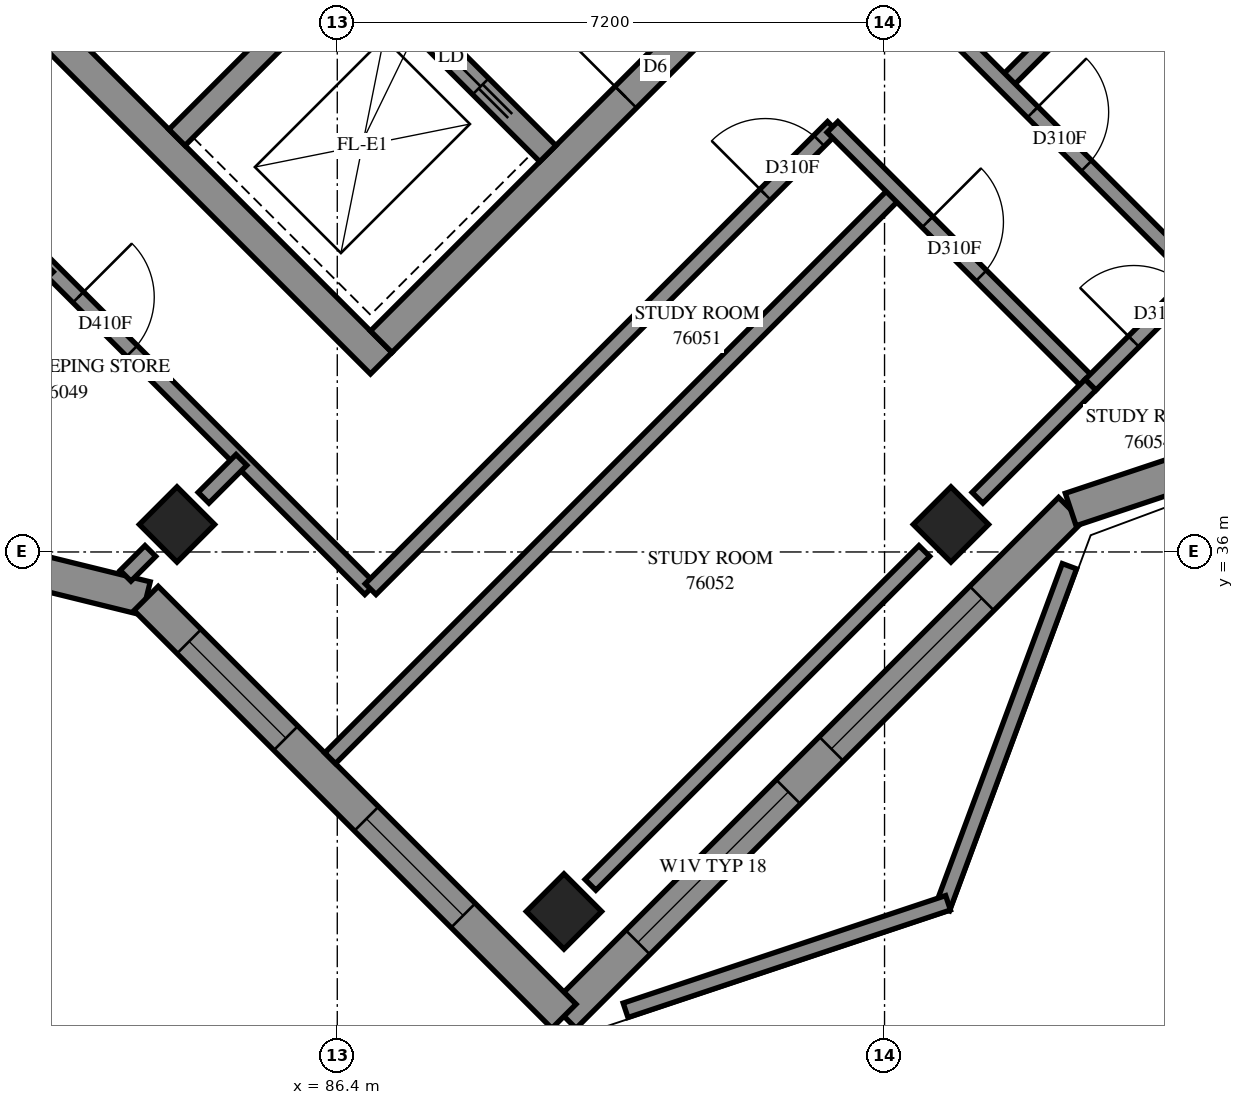
"""IFC4 building model, lengths in metres.
Left out: names, types, materials, properties, quantities, classifications, styles, units other than length and angle.
Written with IfcOpenShell. Run it as: python <this file> out.ifc"""

import sys

from ifc_helpers import new_model, si_unit, direction, frame, frame_2d, origin, origin_2d, place, context, subcontext, project, spatial, polyline, rectangle, outline, extrude, element, fill, save


model = new_model("IFC4")
c1 = context("Model", 3, precision=1e-05, world=origin(), true_north=direction((0.0, 1.0)))
c2 = subcontext(c1, "Body", "Model", "MODEL_VIEW")
j1 = project(units=[si_unit("LENGTHUNIT", "METRE"), si_unit("PLANEANGLEUNIT", "RADIAN")], contexts=[c1])
p1 = place(None, origin())
s1 = spatial("IfcSite", under=j1, at=p1, CompositionType="ELEMENT")
p2 = place(p1, origin())
s2 = spatial("IfcBuilding", under=s1, at=p2, CompositionType="ELEMENT")
p3 = place(p2, frame((0.0, 0.0, 277.8)))
s3 = spatial("IfcBuildingStorey", under=s2, at=p3, CompositionType="ELEMENT", Elevation=277.8)
for number, where, z_axis, x_axis in (
    (1, (84.291, 36.362, 0.0), (0.0, 0.0, 1.0), (0.707, -0.707, 0.0)),
    (2, (94.474, 36.362, 0.0), (0.0, 0.0, 1.0), (0.707, -0.707, 0.0)),
    (3, (89.382, 31.271, 0.0), (0.0, 0.0, 1.0), (0.707, -0.707, 0.0)),
):
    element("IfcColumn", number, at=place(p3, frame(where, z_axis=z_axis, x_axis=x_axis)), inside=s3, PredefinedType="COLUMN", context=c2, shape_type="SweptSolid", body=[
        extrude(rectangle(XDim=0.7, YDim=0.7, at=origin_2d()), origin(), (0.0, 0.0, 1.0), 3.1),
    ])
p4 = place(p3, frame((76.23, 49.231, -0.3), z_axis=(0.0, 0.0, 1.0), x_axis=(0.7071034917, -0.7071100706, 0.0)))
e4 = element("IfcWall", 4, at=p4, inside=s3, PredefinedType="SHEAR", context=c2, shape_type="SweptSolid", body=[
    extrude(rectangle(XDim=15.2, YDim=0.4, at=frame_2d((7.6, 0.0))), origin(), (0.0, 0.0, 1.0), 2.7),
])
p5 = place(p3, frame((86.978, 38.766, -0.3), z_axis=(0.0, 0.0, 1.0), x_axis=(0.7071067812, 0.7071067812, 0.0)))
e5 = element("IfcWall", 5, at=p5, inside=s3, PredefinedType="SHEAR", context=c2, shape_type="SweptSolid", body=[
    extrude(rectangle(XDim=14.4, YDim=0.4, at=frame_2d((7.2, 0.0))), origin(), (0.0, 0.0, 1.0), 2.7),
])
p6 = place(p5, frame((4.55, 0.0, 0.3)))
e6 = element("IfcOpeningElement", 6, at=p6, cuts=e5, PredefinedType="OPENING", context=c2, shape_type="SweptSolid", body=[
    extrude(rectangle(XDim=1.1, YDim=2.1, at=frame_2d((0.55, 1.05))), frame((0.0, 0.21, 0.0), z_axis=(0.0, -1.0, 0.0), x_axis=(1.0, 0.0, 0.0)), (0.0, 0.0, 1.0), 0.42),
])
p7 = place(p5, frame((11.35, 0.0, 0.3)))
e7 = element("IfcOpeningElement", 7, at=p7, cuts=e5, PredefinedType="OPENING", context=c2, shape_type="SweptSolid", body=[
    extrude(rectangle(XDim=1.1, YDim=2.1, at=frame_2d((0.55, 1.05))), frame((0.0, 0.21, 0.0), z_axis=(0.0, -1.0, 0.0), x_axis=(1.0, 0.0, 0.0)), (0.0, 0.0, 1.0), 0.42),
])
p8 = place(p3, frame((84.291, 41.453, 0.0), z_axis=(0.0, 0.0, 1.0), x_axis=(0.7071067812, 0.7071067812, 0.0)))
e8 = element("IfcWall", 8, at=p8, inside=s3, PredefinedType="SOLIDWALL", context=c2, shape_type="SweptSolid", body=[
    extrude(rectangle(XDim=3.3, YDim=0.3, at=frame_2d((1.65, 0.0))), origin(), (0.0, 0.0, 1.0), 3.1),
])
p9 = place(p3, frame((78.988, 51.423, 0.0), z_axis=(0.0, 0.0, 1.0), x_axis=(0.7071067812, -0.7071067812, 0.0)))
e9 = element("IfcWall", 9, at=p9, inside=s3, PredefinedType="SOLIDWALL", context=c2, shape_type="SweptSolid", body=[
    extrude(rectangle(XDim=14.4, YDim=0.3, at=frame_2d((7.2, 0.0))), origin(), (0.0, 0.0, 1.0), 3.1),
])
p10 = place(p9, frame((1.35, 0.0, 0.0)))
e10 = element("IfcOpeningElement", 10, at=p10, cuts=e9, PredefinedType="OPENING", context=c2, shape_type="SweptSolid", body=[
    extrude(rectangle(XDim=0.9, YDim=2.1, at=frame_2d((0.45, 1.05))), frame((0.0, 0.16, 0.0), z_axis=(0.0, -1.0, 0.0), x_axis=(1.0, 0.0, 0.0)), (0.0, 0.0, 1.0), 0.32),
])
p11 = place(p9, frame((4.95, 0.0, 0.0)))
e11 = element("IfcOpeningElement", 11, at=p11, cuts=e9, PredefinedType="OPENING", context=c2, shape_type="SweptSolid", body=[
    extrude(rectangle(XDim=0.9, YDim=2.1, at=frame_2d((0.45, 1.05))), frame((0.0, 0.16, 0.0), z_axis=(0.0, -1.0, 0.0), x_axis=(1.0, 0.0, 0.0)), (0.0, 0.0, 1.0), 0.32),
])
p12 = place(p9, frame((8.55, 0.0, 0.0)))
e12 = element("IfcOpeningElement", 12, at=p12, cuts=e9, PredefinedType="OPENING", context=c2, shape_type="SweptSolid", body=[
    extrude(rectangle(XDim=0.9, YDim=2.1, at=frame_2d((0.45, 1.05))), frame((0.0, 0.16, 0.0), z_axis=(0.0, -1.0, 0.0), x_axis=(1.0, 0.0, 0.0)), (0.0, 0.0, 1.0), 0.32),
])
p13 = place(p9, frame((12.05, 0.0, 0.0)))
e13 = element("IfcOpeningElement", 13, at=p13, cuts=e9, PredefinedType="OPENING", context=c2, shape_type="SweptSolid", body=[
    extrude(rectangle(XDim=1.1, YDim=2.1, at=frame_2d((0.55, 1.05))), frame((0.0, 0.16, 0.0), z_axis=(0.0, -1.0, 0.0), x_axis=(1.0, 0.0, 0.0)), (0.0, 0.0, 1.0), 0.32),
])
p14 = place(p3, frame((89.382, 29.892, 0.0), z_axis=(0.0, 0.0, 1.0), x_axis=(0.7071067812, 0.7071067812, 0.0)))
e14 = element("IfcWall", 14, at=p14, inside=s3, PredefinedType="SOLIDWALL", context=c2, shape_type="SweptSolid", body=[
    extrude(outline(polyline([(-0.225, -0.225), (9.375, -0.225), (9.481, 0.225), (0.225, 0.225), (-0.225, -0.225)])), origin(), (0.0, 0.0, 1.0), 3.1),
])
p15 = place(p14, frame((1.375, 0.0, 0.45)))
e15 = element("IfcOpeningElement", 15, at=p15, cuts=e14, PredefinedType="OPENING", context=c2, shape_type="SweptSolid", body=[
    extrude(rectangle(XDim=2.8, YDim=2.55, at=frame_2d((1.4, 1.275))), frame((0.0, 0.235, 0.0), z_axis=(0.0, -1.0, 0.0), x_axis=(1.0, 0.0, 0.0)), (0.0, 0.0, 1.0), 0.47),
])
p16 = place(p14, frame((4.975, 0.0, 0.45)))
e16 = element("IfcOpeningElement", 16, at=p16, cuts=e14, PredefinedType="OPENING", context=c2, shape_type="SweptSolid", body=[
    extrude(rectangle(XDim=2.8, YDim=2.55, at=frame_2d((1.4, 1.275))), frame((0.0, 0.235, 0.0), z_axis=(0.0, -1.0, 0.0), x_axis=(1.0, 0.0, 0.0)), (0.0, 0.0, 1.0), 0.47),
])
p17 = place(p3, frame((96.049, 36.559, 0.0), z_axis=(0.0, 0.0, 1.0), x_axis=(0.9486870665, 0.3162164604, 0.0)))
e17 = element("IfcWall", 17, at=p17, inside=s3, PredefinedType="SOLIDWALL", context=c2, shape_type="SweptSolid", body=[
    extrude(outline(polyline([(0.053, -0.225), (5.42, -0.225), (5.195, 0.225), (-0.053, 0.225), (0.053, -0.225)])), origin(), (0.0, 0.0, 1.0), 3.1),
])
p18 = place(p17, frame((1.704, 0.0, 0.45)))
e18 = element("IfcOpeningElement", 18, at=p18, cuts=e17, PredefinedType="OPENING", context=c2, shape_type="SweptSolid", body=[
    extrude(rectangle(XDim=2.8, YDim=2.55, at=frame_2d((1.4, 1.275))), frame((0.0, 0.235, 0.0), z_axis=(0.0, -1.0, 0.0), x_axis=(1.0, 0.0, 0.0)), (0.0, 0.0, 1.0), 0.47),
])
p19 = place(p3, frame((79.454, 36.48, 0.0), z_axis=(0.0, 0.0, 1.0), x_axis=(0.9709986041, -0.239085154, 0.0)))
e19 = element("IfcWall", 19, at=p19, inside=s3, PredefinedType="SOLIDWALL", context=c2, shape_type="SweptSolid", body=[
    extrude(outline(polyline([(-0.136, -0.225), (4.501, -0.225), (4.627, 0.225), (0.136, 0.225), (-0.136, -0.225)])), origin(), (0.0, 0.0, 1.0), 3.1),
])
p20 = place(p19, frame((0.991, 0.0, 0.7)))
e20 = element("IfcOpeningElement", 20, at=p20, cuts=e19, PredefinedType="OPENING", context=c2, shape_type="SweptSolid", body=[
    extrude(rectangle(XDim=1.8, YDim=1.8, at=frame_2d((0.9, 0.9))), frame((0.0, 0.235, 0.0), z_axis=(0.0, -1.0, 0.0), x_axis=(1.0, 0.0, 0.0)), (0.0, 0.0, 1.0), 0.47),
])
p21 = place(p3, frame((83.885, 35.389, 0.0), z_axis=(0.0, 0.0, 1.0), x_axis=(0.7071067812, -0.7071067812, 0.0)))
e21 = element("IfcWall", 21, at=p21, inside=s3, PredefinedType="SOLIDWALL", context=c2, shape_type="SweptSolid", body=[
    extrude(outline(polyline([(0.063, -0.225), (7.999, -0.225), (7.549, 0.225), (-0.063, 0.225), (0.063, -0.225)])), origin(), (0.0, 0.0, 1.0), 3.1),
])
p22 = place(p21, frame((0.799, 0.0, 0.7)))
e22 = element("IfcOpeningElement", 22, at=p22, cuts=e21, PredefinedType="OPENING", context=c2, shape_type="SweptSolid", body=[
    extrude(rectangle(XDim=1.8, YDim=1.8, at=frame_2d((0.9, 0.9))), frame((0.0, 0.235, 0.0), z_axis=(0.0, -1.0, 0.0), x_axis=(1.0, 0.0, 0.0)), (0.0, 0.0, 1.0), 0.47),
])
p23 = place(p21, frame((4.099, 0.0, 0.7)))
e23 = element("IfcOpeningElement", 23, at=p23, cuts=e21, PredefinedType="OPENING", context=c2, shape_type="SweptSolid", body=[
    extrude(rectangle(XDim=1.8, YDim=1.8, at=frame_2d((0.9, 0.9))), frame((0.0, 0.235, 0.0), z_axis=(0.0, -1.0, 0.0), x_axis=(1.0, 0.0, 0.0)), (0.0, 0.0, 1.0), 0.47),
])
p24 = place(p3, frame((86.306, 33.287, 0.0), z_axis=(0.0, 0.0, 1.0), x_axis=(0.7071020418, 0.7071115206, 0.0)))
e24 = element("IfcWall", 24, at=p24, inside=s3, PredefinedType="PARTITIONING", context=c2, shape_type="SweptSolid", body=[
    extrude(rectangle(XDim=10.55, YDim=0.2, at=frame_2d((5.275, 0.0))), origin(), (0.0, 0.0, 1.0), 3.1),
])
p25 = place(p3, frame((80.747, 41.597, 0.0), z_axis=(0.0, 0.0, 1.0), x_axis=(0.7071067812, -0.7071067812, 0.0)))
e25 = element("IfcWall", 25, at=p25, inside=s3, PredefinedType="PARTITIONING", context=c2, shape_type="SweptSolid", body=[
    extrude(rectangle(XDim=8.607, YDim=0.2, at=frame_2d((4.303, 0.0))), origin(), (0.0, 0.0, 1.0), 3.1),
])
p26 = place(p25, frame((0.195, 0.0, 0.0)))
e26 = element("IfcOpeningElement", 26, at=p26, cuts=e25, PredefinedType="OPENING", context=c2, shape_type="SweptSolid", body=[
    extrude(rectangle(XDim=1.0, YDim=2.1, at=frame_2d((0.5, 1.05))), frame((0.0, 0.11, 0.0), z_axis=(0.0, -1.0, 0.0), x_axis=(1.0, 0.0, 0.0)), (0.0, 0.0, 1.0), 0.22),
])
p27 = place(p25, frame((3.175, 0.0, 0.0)))
e27 = element("IfcOpeningElement", 27, at=p27, cuts=e25, PredefinedType="OPENING", context=c2, shape_type="SweptSolid", body=[
    extrude(rectangle(XDim=1.0, YDim=2.1, at=frame_2d((0.5, 1.05))), frame((0.0, 0.11, 0.0), z_axis=(0.0, -1.0, 0.0), x_axis=(1.0, 0.0, 0.0)), (0.0, 0.0, 1.0), 0.22),
])
p28 = place(p3, frame((86.839, 35.511, 0.0), z_axis=(0.0, 0.0, 1.0), x_axis=(0.707223053, 0.7069904903, 0.0)))
e28 = element("IfcWall", 28, at=p28, inside=s3, PredefinedType="PARTITIONING", context=c2, shape_type="SweptSolid", body=[
    extrude(rectangle(XDim=8.6, YDim=0.2, at=frame_2d((4.3, 0.0))), origin(), (0.0, 0.0, 1.0), 3.1),
])
p29 = place(p28, frame((7.343, 0.0, 0.0)))
e29 = element("IfcOpeningElement", 29, at=p29, cuts=e28, PredefinedType="OPENING", context=c2, shape_type="SweptSolid", body=[
    extrude(rectangle(XDim=1.0, YDim=2.1, at=frame_2d((0.5, 1.05))), frame((0.0, 0.11, 0.0), z_axis=(0.0, -1.0, 0.0), x_axis=(1.0, 0.0, 0.0)), (0.0, 0.0, 1.0), 0.22),
])
p30 = place(p3, frame((89.731, 31.621, 0.0), z_axis=(0.0, 0.0, 1.0), x_axis=(0.7071067812, 0.7071067812, 0.0)))
e30 = element("IfcWall", 30, at=p30, inside=s3, PredefinedType="PARTITIONING", context=c2, shape_type="SweptSolid", body=[
    extrude(rectangle(XDim=6.211, YDim=0.2, at=frame_2d((3.106, 0.0))), origin(), (0.0, 0.0, 1.0), 2.6),
])
p31 = place(p3, frame((95.179, 42.161, 0.0), z_axis=(0.0, 0.0, 1.0), x_axis=(0.707115476, 0.7070980863, 0.0)))
e31 = element("IfcWall", 31, at=p31, inside=s3, PredefinedType="PARTITIONING", context=c2, shape_type="SweptSolid", body=[
    extrude(rectangle(XDim=5.75, YDim=0.2, at=frame_2d((2.875, 0.0))), origin(), (0.0, 0.0, 1.0), 3.1),
])
p32 = place(p3, frame((92.915, 41.591, 0.0), z_axis=(0.0, 0.0, 1.0), x_axis=(0.7071067812, -0.7071067812, 0.0)))
e32 = element("IfcWall", 32, at=p32, inside=s3, PredefinedType="PARTITIONING", context=c2, shape_type="SweptSolid", body=[
    extrude(rectangle(XDim=4.8, YDim=0.2, at=frame_2d((2.4, 0.0))), origin(), (0.0, 0.0, 1.0), 3.1),
])
p33 = place(p32, frame((1.767, 0.0, 0.0)))
e33 = element("IfcOpeningElement", 33, at=p33, cuts=e32, PredefinedType="OPENING", context=c2, shape_type="SweptSolid", body=[
    extrude(rectangle(XDim=1.0, YDim=2.1, at=frame_2d((0.5, 1.05))), frame((0.0, 0.11, 0.0), z_axis=(0.0, -1.0, 0.0), x_axis=(1.0, 0.0, 0.0)), (0.0, 0.0, 1.0), 0.22),
])
p34 = place(p3, frame((94.329, 43.005, 0.0), z_axis=(0.0, 0.0, 1.0), x_axis=(0.7071067812, -0.7071067812, 0.0)))
e34 = element("IfcWall", 34, at=p34, inside=s3, PredefinedType="PARTITIONING", context=c2, shape_type="SweptSolid", body=[
    extrude(rectangle(XDim=4.8, YDim=0.2, at=frame_2d((2.4, 0.0))), origin(), (0.0, 0.0, 1.0), 3.1),
])
p35 = place(p34, frame((1.725, 0.0, 0.0)))
e35 = element("IfcOpeningElement", 35, at=p35, cuts=e34, PredefinedType="OPENING", context=c2, shape_type="SweptSolid", body=[
    extrude(rectangle(XDim=1.0, YDim=2.1, at=frame_2d((0.5, 1.05))), frame((0.0, 0.11, 0.0), z_axis=(0.0, -1.0, 0.0), x_axis=(1.0, 0.0, 0.0)), (0.0, 0.0, 1.0), 0.22),
])
p36 = place(p3, frame((79.612, 36.776, 0.0), z_axis=(0.0, 0.0, 1.0), x_axis=(0.7071186423, 0.7070949199, 0.0)))
e36 = element("IfcWall", 36, at=p36, inside=s3, PredefinedType="PARTITIONING", context=c2, shape_type="SweptSolid", body=[
    extrude(rectangle(XDim=4.215, YDim=0.2, at=frame_2d((2.108, 0.0))), origin(), (0.0, 0.0, 1.0), 3.1),
])
p37 = place(p3, frame((94.823, 36.713, 0.0), z_axis=(0.0, 0.0, 1.0), x_axis=(0.7071067812, 0.7071067812, 0.0)))
e37 = element("IfcWall", 37, at=p37, inside=s3, PredefinedType="PARTITIONING", context=c2, shape_type="SweptSolid", body=[
    extrude(rectangle(XDim=2.104, YDim=0.2, at=frame_2d((1.052, 0.0))), origin(), (0.0, 0.0, 1.0), 2.6),
])
p38 = place(p3, frame((96.311, 38.201, 0.0), z_axis=(0.0, 0.0, 1.0), x_axis=(0.7071067812, 0.7071067812, 0.0)))
e38 = element("IfcWall", 38, at=p38, inside=s3, PredefinedType="PARTITIONING", context=c2, shape_type="SweptSolid", body=[
    extrude(rectangle(XDim=2.0, YDim=0.2, at=frame_2d((1.0, 0.0))), origin(), (0.0, 0.0, 1.0), 2.6),
])
p39 = place(p38, frame((0.803, 0.0, 0.0)))
e39 = element("IfcOpeningElement", 39, at=p39, cuts=e38, PredefinedType="OPENING", context=c2, shape_type="SweptSolid", body=[
    extrude(rectangle(XDim=1.0, YDim=2.1, at=frame_2d((0.5, 1.05))), frame((0.0, 0.11, 0.0), z_axis=(0.0, -1.0, 0.0), x_axis=(1.0, 0.0, 0.0)), (0.0, 0.0, 1.0), 0.22),
])
p40 = place(p3, frame((84.641, 36.713, 0.0), z_axis=(0.0, 0.0, 1.0), x_axis=(0.7071067812, 0.7071067812, 0.0)))
e40 = element("IfcWall", 40, at=p40, inside=s3, PredefinedType="PARTITIONING", context=c2, shape_type="SweptSolid", body=[
    extrude(rectangle(XDim=0.704, YDim=0.2, at=frame_2d((0.352, 0.0))), origin(), (0.0, 0.0, 1.0), 3.1),
])
p41 = place(p3, frame((83.615, 35.687, 0.0), z_axis=(0.0, 0.0, 1.0), x_axis=(0.7069983375, 0.7072152082, 0.0)))
e41 = element("IfcWall", 41, at=p41, inside=s3, PredefinedType="PARTITIONING", context=c2, shape_type="SweptSolid", body=[
    extrude(rectangle(XDim=0.461, YDim=0.2, at=frame_2d((0.231, 0.0))), origin(), (0.0, 0.0, 1.0), 3.1),
])
p42 = place(p3, frame((96.032, 35.812, 0.0), z_axis=(0.0, 0.0, 1.0), x_axis=(-0.3481765915, -0.9374289633, 0.0)))
e42 = element("IfcWall", 42, at=p42, inside=s3, PredefinedType="PARAPET", context=c2, shape_type="SweptSolid", body=[
    extrude(rectangle(XDim=4.8, YDim=0.2, at=frame_2d((2.4, 0.0))), origin(), (0.0, 0.0, 1.0), 0.2),
])
p43 = place(p3, frame((94.436, 31.384, 0.0), z_axis=(0.0, 0.0, 1.0), x_axis=(-0.9486832981, -0.316227766, 0.0)))
e43 = element("IfcWall", 43, at=p43, inside=s3, PredefinedType="PARAPET", context=c2, shape_type="SweptSolid", body=[
    extrude(rectangle(XDim=4.472, YDim=0.2, at=frame_2d((2.236, 0.0))), origin(), (0.0, 0.0, 1.0), 0.2),
])
p44 = place(p15, origin())
e44 = element("IfcWindow", 44, at=p44, inside=s3, PartitioningType="SINGLE_PANEL", PredefinedType="WINDOW", context=c2, shape_type="SweptSolid", body=[
    extrude(rectangle(XDim=2.8, YDim=2.55, at=frame_2d((1.4, 1.275))), frame((0.0, 0.205, 0.0), z_axis=(0.0, -1.0, 0.0), x_axis=(1.0, 0.0, 0.0)), (0.0, 0.0, 1.0), 0.06),
])
fill(e15, e44)
p45 = place(p16, origin())
e45 = element("IfcWindow", 45, at=p45, inside=s3, PartitioningType="SINGLE_PANEL", PredefinedType="WINDOW", context=c2, shape_type="SweptSolid", body=[
    extrude(rectangle(XDim=2.8, YDim=2.55, at=frame_2d((1.4, 1.275))), frame((0.0, 0.205, 0.0), z_axis=(0.0, -1.0, 0.0), x_axis=(1.0, 0.0, 0.0)), (0.0, 0.0, 1.0), 0.06),
])
fill(e16, e45)
p46 = place(p22, origin())
e46 = element("IfcWindow", 46, at=p46, inside=s3, PartitioningType="SINGLE_PANEL", PredefinedType="WINDOW", context=c2, shape_type="SweptSolid", body=[
    extrude(rectangle(XDim=1.8, YDim=1.8, at=frame_2d((0.9, 0.9))), frame((0.0, 0.205, 0.0), z_axis=(0.0, -1.0, 0.0), x_axis=(1.0, 0.0, 0.0)), (0.0, 0.0, 1.0), 0.06),
])
fill(e22, e46)
p47 = place(p23, origin())
e47 = element("IfcWindow", 47, at=p47, inside=s3, PartitioningType="SINGLE_PANEL", PredefinedType="WINDOW", context=c2, shape_type="SweptSolid", body=[
    extrude(rectangle(XDim=1.8, YDim=1.8, at=frame_2d((0.9, 0.9))), frame((0.0, 0.205, 0.0), z_axis=(0.0, -1.0, 0.0), x_axis=(1.0, 0.0, 0.0)), (0.0, 0.0, 1.0), 0.06),
])
fill(e23, e47)
p48 = place(p6, origin())
e48 = element("IfcDoor", 48, at=p48, inside=s3, OperationType="DOUBLE_DOOR_SINGLE_SWING", PredefinedType="DOOR", context=c2, shape_type="SweptSolid", body=[
    extrude(rectangle(XDim=1.1, YDim=2.1, at=frame_2d((0.55, 1.05))), frame((0.0, 0.025, 0.0), z_axis=(0.0, -1.0, 0.0), x_axis=(1.0, 0.0, 0.0)), (0.0, 0.0, 1.0), 0.05),
])
fill(e6, e48)
p49 = place(p13, origin())
e49 = element("IfcDoor", 49, at=p49, inside=s3, OperationType="SLIDING_TO_RIGHT", PredefinedType="DOOR", context=c2, shape_type="SweptSolid", body=[
    extrude(rectangle(XDim=1.1, YDim=2.1, at=frame_2d((0.55, 1.05))), frame((0.0, 0.025, 0.0), z_axis=(0.0, -1.0, 0.0), x_axis=(1.0, 0.0, 0.0)), (0.0, 0.0, 1.0), 0.05),
])
fill(e13, e49)
p50 = place(p27, origin())
e50 = element("IfcDoor", 50, at=p50, inside=s3, OperationType="SINGLE_SWING_LEFT", PredefinedType="DOOR", context=c2, shape_type="SweptSolid", body=[
    extrude(rectangle(XDim=1.0, YDim=2.1, at=frame_2d((0.5, 1.05))), frame((0.0, 0.025, 0.0), z_axis=(0.0, -1.0, 0.0), x_axis=(1.0, 0.0, 0.0)), (0.0, 0.0, 1.0), 0.05),
])
fill(e27, e50)
p51 = place(p29, origin())
e51 = element("IfcDoor", 51, at=p51, inside=s3, OperationType="SINGLE_SWING_RIGHT", PredefinedType="DOOR", context=c2, shape_type="SweptSolid", body=[
    extrude(rectangle(XDim=1.0, YDim=2.1, at=frame_2d((0.5, 1.05))), frame((0.0, 0.025, 0.0), z_axis=(0.0, -1.0, 0.0), x_axis=(1.0, 0.0, 0.0)), (0.0, 0.0, 1.0), 0.05),
])
fill(e29, e51)
p52 = place(p33, origin())
e52 = element("IfcDoor", 52, at=p52, inside=s3, OperationType="SINGLE_SWING_LEFT", PredefinedType="DOOR", context=c2, shape_type="SweptSolid", body=[
    extrude(rectangle(XDim=1.0, YDim=2.1, at=frame_2d((0.5, 1.05))), frame((0.0, 0.025, 0.0), z_axis=(0.0, -1.0, 0.0), x_axis=(1.0, 0.0, 0.0)), (0.0, 0.0, 1.0), 0.05),
])
fill(e33, e52)
p53 = place(p35, origin())
e53 = element("IfcDoor", 53, at=p53, inside=s3, OperationType="SINGLE_SWING_RIGHT", PredefinedType="DOOR", context=c2, shape_type="SweptSolid", body=[
    extrude(rectangle(XDim=1.0, YDim=2.1, at=frame_2d((0.5, 1.05))), frame((0.0, 0.025, 0.0), z_axis=(0.0, -1.0, 0.0), x_axis=(1.0, 0.0, 0.0)), (0.0, 0.0, 1.0), 0.05),
])
fill(e35, e53)
p54 = place(p39, origin())
e54 = element("IfcDoor", 54, at=p54, inside=s3, OperationType="SINGLE_SWING_RIGHT", PredefinedType="DOOR", context=c2, shape_type="SweptSolid", body=[
    extrude(rectangle(XDim=1.0, YDim=2.1, at=frame_2d((0.5, 1.05))), frame((0.0, 0.025, 0.0), z_axis=(0.0, -1.0, 0.0), x_axis=(1.0, 0.0, 0.0)), (0.0, 0.0, 1.0), 0.05),
])
fill(e39, e54)
save(model, sys.argv[1])
